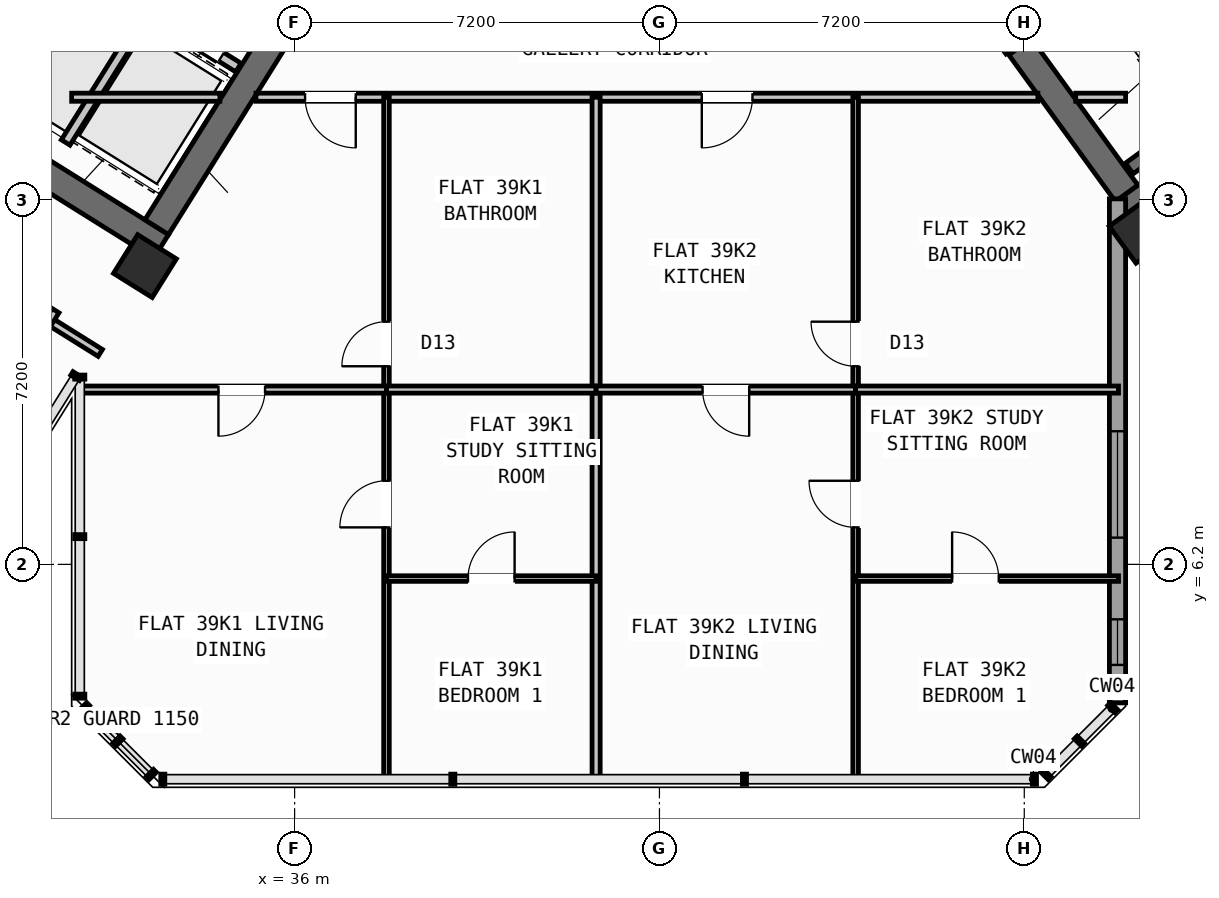
"""IFC4 building model, lengths in metres.
Left out: names, types, materials, properties, quantities, classifications, styles, units other than length and angle.
Written with IfcOpenShell. Run it as: python <this file> out.ifc"""

import sys

from ifc_helpers import new_model, si_unit, direction, frame, frame_2d, origin, origin_2d, place, context, subcontext, project, spatial, rectangle, hollow_rectangle, extrude, source, transform, mapped, element, fill, save


model = new_model("IFC4")
c1 = context("Model", 3, precision=1e-05, world=origin(), true_north=direction((0.0, 1.0)))
c2 = subcontext(c1, "Body", "Model", "MODEL_VIEW")
j1 = project(units=[si_unit("LENGTHUNIT", "METRE"), si_unit("PLANEANGLEUNIT", "RADIAN")], contexts=[c1])
p1 = place(None, origin())
s1 = spatial("IfcSite", under=j1, at=p1, CompositionType="ELEMENT")
p2 = place(p1, origin())
s2 = spatial("IfcBuilding", under=s1, at=p2, CompositionType="ELEMENT")
p3 = place(p2, frame((0.0, 0.0, 155.1)))
s3 = spatial("IfcBuildingStorey", under=s2, at=p3, CompositionType="ELEMENT", Elevation=155.1)
p4 = place(p3, frame((33.366, 12.477, 0.0), z_axis=(0.0, 0.0, 1.0), x_axis=(-0.848047359947, 0.529920442413, 0.0)))
e1 = element("IfcWall", 1, at=p4, inside=s3, PredefinedType="SHEAR", context=c2, shape_type="SweptSolid", body=[
    extrude(rectangle(XDim=13.14, YDim=0.55, at=frame_2d((6.57, 0.0))), origin(), (0.0, 0.0, 1.0), 3.35),
])
p5 = place(p3, frame((36.683, 18.304, 0.0), z_axis=(0.0, 0.0, 1.0), x_axis=(-0.529896466841, -0.848062341122, 0.0)))
e2 = element("IfcWall", 2, at=p5, inside=s3, PredefinedType="SHEAR", context=c2, shape_type="SweptSolid", body=[
    extrude(rectangle(XDim=6.425, YDim=0.55, at=frame_2d((3.212, 0.0))), origin(), (0.0, 0.0, 1.0), 3.35),
])
p6 = place(p3, frame((52.359, 13.14, 0.0), z_axis=(0.0, 0.0, 1.0), x_axis=(0.809014896919, 0.587788139183, 0.0)))
e3 = element("IfcWall", 3, at=p6, inside=s3, PredefinedType="SHEAR", context=c2, shape_type="SweptSolid", body=[
    extrude(rectangle(XDim=12.34, YDim=0.55, at=frame_2d((6.17, 0.0))), origin(), (0.0, 0.0, 1.0), 3.35),
])
p7 = place(p3, frame((52.42, 13.524, 0.0), z_axis=(0.0, 0.0, 1.0), x_axis=(-0.587802113096, 0.809004744015, 0.0)))
e4 = element("IfcWall", 4, at=p7, inside=s3, PredefinedType="SHEAR", context=c2, shape_type="SweptSolid", body=[
    extrude(rectangle(XDim=3.575, YDim=0.55, at=frame_2d((1.788, 0.0))), origin(), (0.0, 0.0, 1.0), 3.35),
])
m1 = source(origin(), c2, "Body", "SweptSolid", [
    extrude(hollow_rectangle(XDim=0.9, YDim=0.9, WallThickness=0.036, at=origin_2d()), origin(), (0.0, 0.0, 1.0), 3.6),
])
for number, where, z_axis, x_axis in (
    (5, (33.046, 12.087, 0.0), (0.0, 0.0, 1.0), (-0.848, 0.53, 0.0)),
    (6, (52.705, 12.773, 0.0), (0.0, 0.0, 1.0), (0.809, 0.588, 0.0)),
):
    element("IfcColumn", number, at=place(p3, frame(where, z_axis=z_axis, x_axis=x_axis)), inside=s3, PredefinedType="COLUMN", context=c2, shape_type="MappedRepresentation", body=[
        mapped(m1, transform((0.0, 0.0, 0.0), scale=1.0)),
    ])
p8 = place(p3, frame((56.581, 7.439, 0.0), z_axis=(0.0, 0.0, 1.0), x_axis=(-0.587771678454, 0.809026856172, 0.0)))
e7 = element("IfcWall", 7, at=p8, inside=s3, PredefinedType="STANDARD", context=c2, shape_type="SweptSolid", body=[
    extrude(rectangle(XDim=6.824, YDim=0.32, at=frame_2d((3.412, 0.0))), origin(), (0.0, 0.0, 1.0), 2.775),
])
p9 = place(p8, frame((1.531, 0.0, 0.8)))
e8 = element("IfcOpeningElement", 8, at=p9, cuts=e7, PredefinedType="OPENING", context=c2, shape_type="SweptSolid", body=[
    extrude(rectangle(XDim=2.1, YDim=1.55, at=frame_2d((1.05, 0.775))), frame((0.0, 0.17, 0.0), z_axis=(0.0, -1.0, 0.0), x_axis=(1.0, 0.0, 0.0)), (0.0, 0.0, 1.0), 0.34),
])
p10 = place(p3, frame((52.24, 13.414, 0.0), z_axis=(0.0, 0.0, 1.0), x_axis=(0.0, -1.0, 0.0)))
e9 = element("IfcWall", 9, at=p10, inside=s3, PredefinedType="STANDARD", context=c2, shape_type="SweptSolid", body=[
    extrude(rectangle(XDim=9.948, YDim=0.32, at=frame_2d((4.974, 0.0))), origin(), (0.0, 0.0, 1.0), 3.35),
])
p11 = place(p10, frame((4.586, 0.0, 0.8)))
e10 = element("IfcOpeningElement", 10, at=p11, cuts=e9, PredefinedType="OPENING", context=c2, shape_type="SweptSolid", body=[
    extrude(rectangle(XDim=2.1, YDim=1.55, at=frame_2d((1.05, 0.775))), frame((0.0, 0.17, 0.0), z_axis=(0.0, -1.0, 0.0), x_axis=(1.0, 0.0, 0.0)), (0.0, 0.0, 1.0), 0.34),
])
p12 = place(p10, frame((8.298, 0.0, 1.0)))
e11 = element("IfcOpeningElement", 11, at=p12, cuts=e9, PredefinedType="OPENING", context=c2, shape_type="SweptSolid", body=[
    extrude(rectangle(XDim=0.9, YDim=1.25, at=frame_2d((0.45, 0.625))), frame((0.0, 0.17, 0.0), z_axis=(0.0, -1.0, 0.0), x_axis=(1.0, 0.0, 0.0)), (0.0, 0.0, 1.0), 0.34),
])
p13 = place(p3, frame((31.288, 18.256, 0.0), z_axis=(0.0, 0.0, 1.0), x_axis=(-0.529943379326, -0.848033026897, 0.0)))
e12 = element("IfcWall", 12, at=p13, inside=s3, PredefinedType="SHEAR", context=c2, shape_type="SweptSolid", body=[
    extrude(rectangle(XDim=3.16, YDim=0.26, at=frame_2d((1.58, 0.0))), origin(), (0.0, 0.0, 1.0), 3.35),
])
p14 = place(p3, frame((34.891, 16.005, 0.0), z_axis=(0.0, 0.0, 1.0), x_axis=(-0.848062873452, 0.529895614884, 0.0)))
e13 = element("IfcWall", 13, at=p14, inside=s3, PredefinedType="STANDARD", context=c2, shape_type="SweptSolid", body=[
    extrude(rectangle(XDim=4.248, YDim=0.2, at=frame_2d((2.124, 0.0))), origin(), (0.0, 0.0, 1.0), 3.34),
])
p15 = place(p14, frame((0.398, 0.0, 0.0)))
e14 = element("IfcOpeningElement", 14, at=p15, cuts=e13, PredefinedType="OPENING", context=c2, shape_type="SweptSolid", body=[
    extrude(rectangle(XDim=1.3, YDim=2.2, at=frame_2d((0.65, 1.1))), frame((0.0, 0.11, 0.0), z_axis=(0.0, -1.0, 0.0), x_axis=(1.0, 0.0, 0.0)), (0.0, 0.0, 1.0), 0.22),
])
p16 = place(p14, frame((2.473, 0.0, 0.0)))
e15 = element("IfcOpeningElement", 15, at=p16, cuts=e13, PredefinedType="OPENING", context=c2, shape_type="SweptSolid", body=[
    extrude(rectangle(XDim=1.45, YDim=2.25, at=frame_2d((0.725, 1.125))), frame((0.0, 0.11, 0.0), z_axis=(0.0, -1.0, 0.0), x_axis=(1.0, 0.0, 0.0)), (0.0, 0.0, 1.0), 0.22),
])
p17 = place(p3, frame((33.029, 17.003, 0.0), z_axis=(0.0, 0.0, 1.0), x_axis=(-0.529916267533, -0.848049968695, 0.0)))
e16 = element("IfcWall", 16, at=p17, inside=s3, PredefinedType="STANDARD", context=c2, shape_type="SweptSolid", body=[
    extrude(rectangle(XDim=2.92, YDim=0.2, at=frame_2d((1.46, 0.0))), origin(), (0.0, 0.0, 1.0), 3.34),
])
p18 = place(p3, frame((52.472, 14.013, 0.0), z_axis=(0.0, 0.0, 1.0), x_axis=(0.809028366311, 0.587769599847, 0.0)))
e17 = element("IfcWall", 17, at=p18, inside=s3, PredefinedType="SHEAR", context=c2, shape_type="SweptSolid", body=[
    extrude(rectangle(XDim=7.33, YDim=0.26, at=frame_2d((3.665, 0.0))), origin(), (0.0, 0.0, 1.0), 3.35),
])
p19 = place(p3, frame((32.164, 10.374, 0.0), z_axis=(0.0, 0.0, 1.0), x_axis=(-0.848044107957, 0.529925646633, 0.0)))
e18 = element("IfcWall", 18, at=p19, inside=s3, PredefinedType="PARTITIONING", context=c2, shape_type="SweptSolid", body=[
    extrude(rectangle(XDim=15.57, YDim=0.16, at=frame_2d((7.785, 0.0))), origin(), (0.0, 0.0, 1.0), 3.34),
])
p20 = place(p19, frame((10.83, 0.0, 0.0)))
e19 = element("IfcOpeningElement", 19, at=p20, cuts=e18, PredefinedType="OPENING", context=c2, shape_type="SweptSolid", body=[
    extrude(rectangle(XDim=1.0, YDim=2.1, at=frame_2d((0.5, 1.05))), frame((0.0, 0.09, 0.0), z_axis=(0.0, -1.0, 0.0), x_axis=(1.0, 0.0, 0.0)), (0.0, 0.0, 1.0), 0.18),
])
p21 = place(p3, frame((31.282, 11.208, 0.0), z_axis=(0.0, 0.0, 1.0), x_axis=(-0.529938869374, -0.84803584519, 0.0)))
e20 = element("IfcWall", 20, at=p21, inside=s3, PredefinedType="PARTITIONING", context=c2, shape_type="SweptSolid", body=[
    extrude(rectangle(XDim=5.48, YDim=0.16, at=frame_2d((2.74, 0.0))), origin(), (0.0, 0.0, 1.0), 3.34),
])
p22 = place(p3, frame((31.6, 15.42, 0.0), z_axis=(0.0, 0.0, 1.0), x_axis=(1.0, 0.0, 0.0)))
e21 = element("IfcWall", 21, at=p22, inside=s3, PredefinedType="PARTITIONING", context=c2, shape_type="SweptSolid", body=[
    extrude(rectangle(XDim=2.925, YDim=0.16, at=frame_2d((1.462, 0.0))), origin(), (0.0, 0.0, 1.0), 3.34),
])
p23 = place(p3, frame((35.237, 15.42, 0.0), z_axis=(0.0, 0.0, 1.0), x_axis=(1.0, 0.0, 0.0)))
e22 = element("IfcWall", 22, at=p23, inside=s3, PredefinedType="PARTITIONING", context=c2, shape_type="SweptSolid", body=[
    extrude(rectangle(XDim=15.432, YDim=0.16, at=frame_2d((7.716, 0.0))), origin(), (0.0, 0.0, 1.0), 3.34),
])
p24 = place(p23, frame((0.969, 0.0, 0.0)))
e23 = element("IfcOpeningElement", 23, at=p24, cuts=e22, PredefinedType="OPENING", context=c2, shape_type="SweptSolid", body=[
    extrude(rectangle(XDim=1.0, YDim=2.1, at=frame_2d((0.5, 1.05))), frame((0.0, 0.09, 0.0), z_axis=(0.0, -1.0, 0.0), x_axis=(1.0, 0.0, 0.0)), (0.0, 0.0, 1.0), 0.18),
])
p25 = place(p23, frame((8.799, 0.0, 0.0)))
e24 = element("IfcOpeningElement", 24, at=p25, cuts=e22, PredefinedType="OPENING", context=c2, shape_type="SweptSolid", body=[
    extrude(rectangle(XDim=1.0, YDim=2.1, at=frame_2d((0.5, 1.05))), frame((0.0, 0.09, 0.0), z_axis=(0.0, -1.0, 0.0), x_axis=(1.0, 0.0, 0.0)), (0.0, 0.0, 1.0), 0.18),
])
p26 = place(p3, frame((51.416, 15.42, 0.0), z_axis=(0.0, 0.0, 1.0), x_axis=(1.0, 0.0, 0.0)))
e25 = element("IfcWall", 25, at=p26, inside=s3, PredefinedType="PARTITIONING", context=c2, shape_type="SweptSolid", body=[
    extrude(rectangle(XDim=0.984, YDim=0.16, at=frame_2d((0.492, 0.0))), origin(), (0.0, 0.0, 1.0), 3.34),
])
p27 = place(p3, frame((50.119, 16.333, 0.0), z_axis=(0.0, 0.0, 1.0), x_axis=(-0.587749856981, 0.809042709391, 0.0)))
e26 = element("IfcWall", 26, at=p27, inside=s3, PredefinedType="STANDARD", context=c2, shape_type="SweptSolid", body=[
    extrude(rectangle(XDim=2.96, YDim=0.2, at=frame_2d((1.48, 0.0))), origin(), (0.0, 0.0, 1.0), 3.34),
])
p28 = place(p27, frame((0.53, 0.0, 0.0)))
e27 = element("IfcOpeningElement", 27, at=p28, cuts=e26, PredefinedType="OPENING", context=c2, shape_type="SweptSolid", body=[
    extrude(rectangle(XDim=1.5, YDim=2.15, at=frame_2d((0.75, 1.075))), frame((0.0, 0.11, 0.0), z_axis=(0.0, -1.0, 0.0), x_axis=(1.0, 0.0, 0.0)), (0.0, 0.0, 1.0), 0.22),
])
p29 = place(p3, frame((41.95, 1.96, 0.0), z_axis=(0.0, 0.0, 1.0), x_axis=(0.0, 1.0, 0.0)))
e28 = element("IfcWall", 28, at=p29, inside=s3, PredefinedType="PARTITIONING", context=c2, shape_type="SweptSolid", body=[
    extrude(rectangle(XDim=13.46, YDim=0.16, at=frame_2d((6.73, 0.0))), origin(), (0.0, 0.0, 1.0), 3.34),
])
p30 = place(p3, frame((37.813, 1.96, 0.0), z_axis=(0.0, 0.0, 1.0), x_axis=(0.0, 1.0, 0.0)))
e29 = element("IfcWall", 29, at=p30, inside=s3, PredefinedType="PARTITIONING", context=c2, shape_type="SweptSolid", body=[
    extrude(rectangle(XDim=13.46, YDim=0.11, at=frame_2d((6.73, 0.0))), origin(), (0.0, 0.0, 1.0), 3.34),
])
p31 = place(p30, frame((4.97, 0.0, 0.0)))
e30 = element("IfcOpeningElement", 30, at=p31, cuts=e29, PredefinedType="OPENING", context=c2, shape_type="SweptSolid", body=[
    extrude(rectangle(XDim=0.92, YDim=2.08, at=frame_2d((0.46, 1.04))), frame((0.0, 0.065, 0.0), z_axis=(0.0, -1.0, 0.0), x_axis=(1.0, 0.0, 0.0)), (0.0, 0.0, 1.0), 0.13),
])
p32 = place(p30, frame((8.15, 0.0, 0.0)))
e31 = element("IfcOpeningElement", 31, at=p32, cuts=e29, PredefinedType="OPENING", context=c2, shape_type="SweptSolid", body=[
    extrude(rectangle(XDim=0.88, YDim=2.08, at=frame_2d((0.44, 1.04))), frame((0.0, 0.065, 0.0), z_axis=(0.0, -1.0, 0.0), x_axis=(1.0, 0.0, 0.0)), (0.0, 0.0, 1.0), 0.13),
])
p33 = place(p3, frame((31.74, 9.65, 0.0), z_axis=(0.0, 0.0, 1.0), x_axis=(1.0, 0.0, 0.0)))
e32 = element("IfcWall", 32, at=p33, inside=s3, PredefinedType="PLUMBINGWALL", context=c2, shape_type="SweptSolid", body=[
    extrude(rectangle(XDim=6.073, YDim=0.14, at=frame_2d((3.037, 0.0))), origin(), (0.0, 0.0, 1.0), 3.34),
])
p34 = place(p33, frame((2.757, 0.0, 0.0)))
e33 = element("IfcOpeningElement", 33, at=p34, cuts=e32, PredefinedType="OPENING", context=c2, shape_type="SweptSolid", body=[
    extrude(rectangle(XDim=0.92, YDim=2.08, at=frame_2d((0.46, 1.04))), frame((0.0, 0.08, 0.0), z_axis=(0.0, -1.0, 0.0), x_axis=(1.0, 0.0, 0.0)), (0.0, 0.0, 1.0), 0.16),
])
p35 = place(p3, frame((37.813, 9.65, 0.0), z_axis=(0.0, 0.0, 1.0), x_axis=(1.0, 0.0, 0.0)))
e34 = element("IfcWall", 34, at=p35, inside=s3, PredefinedType="PLUMBINGWALL", context=c2, shape_type="SweptSolid", body=[
    extrude(rectangle(XDim=4.137, YDim=0.14, at=frame_2d((2.068, 0.0))), origin(), (0.0, 0.0, 1.0), 3.34),
])
p36 = place(p3, frame((37.813, 5.92, 0.0), z_axis=(0.0, 0.0, 1.0), x_axis=(1.0, 0.0, 0.0)))
e35 = element("IfcWall", 35, at=p36, inside=s3, PredefinedType="PARTITIONING", context=c2, shape_type="SweptSolid", body=[
    extrude(rectangle(XDim=4.137, YDim=0.11, at=frame_2d((2.068, 0.0))), origin(), (0.0, 0.0, 1.0), 3.34),
])
p37 = place(p36, frame((1.608, 0.0, 0.0)))
e36 = element("IfcOpeningElement", 36, at=p37, cuts=e35, PredefinedType="OPENING", context=c2, shape_type="SweptSolid", body=[
    extrude(rectangle(XDim=0.92, YDim=2.08, at=frame_2d((0.46, 1.04))), frame((0.0, 0.065, 0.0), z_axis=(0.0, -1.0, 0.0), x_axis=(1.0, 0.0, 0.0)), (0.0, 0.0, 1.0), 0.13),
])
p38 = place(p3, frame((47.072, 1.96, 0.0), z_axis=(0.0, 0.0, 1.0), x_axis=(0.0, 1.0, 0.0)))
e37 = element("IfcWall", 37, at=p38, inside=s3, PredefinedType="PARTITIONING", context=c2, shape_type="SweptSolid", body=[
    extrude(rectangle(XDim=13.46, YDim=0.11, at=frame_2d((6.73, 0.0))), origin(), (0.0, 0.0, 1.0), 3.34),
])
p39 = place(p38, frame((4.97, 0.0, 0.0)))
e38 = element("IfcOpeningElement", 38, at=p39, cuts=e37, PredefinedType="OPENING", context=c2, shape_type="SweptSolid", body=[
    extrude(rectangle(XDim=0.92, YDim=2.08, at=frame_2d((0.46, 1.04))), frame((0.0, 0.065, 0.0), z_axis=(0.0, -1.0, 0.0), x_axis=(1.0, 0.0, 0.0)), (0.0, 0.0, 1.0), 0.13),
])
p40 = place(p38, frame((8.15, 0.0, 0.0)))
e39 = element("IfcOpeningElement", 39, at=p40, cuts=e37, PredefinedType="OPENING", context=c2, shape_type="SweptSolid", body=[
    extrude(rectangle(XDim=0.88, YDim=2.08, at=frame_2d((0.44, 1.04))), frame((0.0, 0.065, 0.0), z_axis=(0.0, -1.0, 0.0), x_axis=(1.0, 0.0, 0.0)), (0.0, 0.0, 1.0), 0.13),
])
p41 = place(p3, frame((41.95, 9.65, 0.0), z_axis=(0.0, 0.0, 1.0), x_axis=(1.0, 0.0, 0.0)))
e40 = element("IfcWall", 40, at=p41, inside=s3, PredefinedType="PLUMBINGWALL", context=c2, shape_type="SweptSolid", body=[
    extrude(rectangle(XDim=5.122, YDim=0.14, at=frame_2d((2.561, 0.0))), origin(), (0.0, 0.0, 1.0), 3.34),
])
p42 = place(p41, frame((2.101, 0.0, 0.0)))
e41 = element("IfcOpeningElement", 41, at=p42, cuts=e40, PredefinedType="OPENING", context=c2, shape_type="SweptSolid", body=[
    extrude(rectangle(XDim=0.92, YDim=2.08, at=frame_2d((0.46, 1.04))), frame((0.0, 0.08, 0.0), z_axis=(0.0, -1.0, 0.0), x_axis=(1.0, 0.0, 0.0)), (0.0, 0.0, 1.0), 0.16),
])
p43 = place(p3, frame((47.072, 9.65, 0.0), z_axis=(0.0, 0.0, 1.0), x_axis=(1.0, 0.0, 0.0)))
e42 = element("IfcWall", 42, at=p43, inside=s3, PredefinedType="PLUMBINGWALL", context=c2, shape_type="SweptSolid", body=[
    extrude(rectangle(XDim=5.188, YDim=0.14, at=frame_2d((2.594, 0.0))), origin(), (0.0, 0.0, 1.0), 3.34),
])
p44 = place(p3, frame((47.072, 5.92, 0.0), z_axis=(0.0, 0.0, 1.0), x_axis=(1.0, 0.0, 0.0)))
e43 = element("IfcWall", 43, at=p44, inside=s3, PredefinedType="PARTITIONING", context=c2, shape_type="SweptSolid", body=[
    extrude(rectangle(XDim=5.188, YDim=0.11, at=frame_2d((2.594, 0.0))), origin(), (0.0, 0.0, 1.0), 3.34),
])
p45 = place(p44, frame((1.904, 0.0, 0.0)))
e44 = element("IfcOpeningElement", 44, at=p45, cuts=e43, PredefinedType="OPENING", context=c2, shape_type="SweptSolid", body=[
    extrude(rectangle(XDim=0.92, YDim=2.08, at=frame_2d((0.46, 1.04))), frame((0.0, 0.065, 0.0), z_axis=(0.0, -1.0, 0.0), x_axis=(1.0, 0.0, 0.0)), (0.0, 0.0, 1.0), 0.13),
])
m2 = source(origin(), c2, "Body", "SweptSolid", [
    extrude(rectangle(XDim=2.1, YDim=1.55, at=frame_2d((1.05, 0.775))), frame((0.0, 0.03, 0.0), z_axis=(0.0, -1.0, 0.0), x_axis=(1.0, 0.0, 0.0)), (0.0, 0.0, 1.0), 0.06),
])
p46 = place(p11, origin())
e45 = element("IfcWindow", 45, at=p46, inside=s3, PartitioningType="SINGLE_PANEL", PredefinedType="WINDOW", context=c2, shape_type="MappedRepresentation", body=[
    mapped(m2, transform((0.0, 0.0, 0.0), scale=1.0)),
])
fill(e10, e45)
m3 = source(origin(), c2, "Body", "SweptSolid", [
    extrude(rectangle(XDim=0.9, YDim=1.25, at=frame_2d((0.45, 0.625))), frame((0.0, 0.03, 0.0), z_axis=(0.0, -1.0, 0.0), x_axis=(1.0, 0.0, 0.0)), (0.0, 0.0, 1.0), 0.06),
])
p47 = place(p12, origin())
e46 = element("IfcWindow", 46, at=p47, inside=s3, PartitioningType="SINGLE_PANEL", PredefinedType="WINDOW", context=c2, shape_type="MappedRepresentation", body=[
    mapped(m3, transform((0.0, 0.0, 0.0), scale=1.0)),
])
fill(e11, e46)
m4 = source(origin(), c2, "Body", "SweptSolid", [
    extrude(rectangle(XDim=1.3, YDim=2.2, at=frame_2d((0.65, 1.1))), frame((0.0, 0.025, 0.0), z_axis=(0.0, -1.0, 0.0), x_axis=(1.0, 0.0, 0.0)), (0.0, 0.0, 1.0), 0.05),
])
p48 = place(p15, origin())
e47 = element("IfcDoor", 47, at=p48, inside=s3, OperationType="DOUBLE_DOOR_SLIDING", PredefinedType="DOOR", context=c2, shape_type="MappedRepresentation", body=[
    mapped(m4, transform((0.0, 0.0, 0.0), scale=1.0)),
])
fill(e14, e47)
m5 = source(origin(), c2, "Body", "SweptSolid", [
    extrude(rectangle(XDim=0.92, YDim=2.08, at=frame_2d((0.46, 1.04))), frame((0.0, 0.025, 0.0), z_axis=(0.0, -1.0, 0.0), x_axis=(1.0, 0.0, 0.0)), (0.0, 0.0, 1.0), 0.05),
])
p49 = place(p31, origin())
e48 = element("IfcDoor", 48, at=p49, inside=s3, OperationType="SINGLE_SWING_LEFT", PredefinedType="DOOR", context=c2, shape_type="MappedRepresentation", body=[
    mapped(m5, transform((0.0, 0.0, 0.0), scale=1.0)),
])
fill(e30, e48)
p50 = place(p37, origin())
e49 = element("IfcDoor", 49, at=p50, inside=s3, OperationType="SINGLE_SWING_RIGHT", PredefinedType="DOOR", context=c2, shape_type="MappedRepresentation", body=[
    mapped(m5, transform((0.0, 0.0, 0.0), scale=1.0)),
])
fill(e36, e49)
m6 = source(origin(), c2, "Body", "SweptSolid", [
    extrude(rectangle(XDim=1.0, YDim=2.1, at=frame_2d((0.5, 1.05))), frame((0.0, 0.025, 0.0), z_axis=(0.0, -1.0, 0.0), x_axis=(1.0, 0.0, 0.0)), (0.0, 0.0, 1.0), 0.05),
])
p51 = place(p24, frame((1.0, 0.0, 0.0), z_axis=(0.0, 0.0, 1.0), x_axis=(-1.0, 0.0, 0.0)))
e50 = element("IfcDoor", 50, at=p51, inside=s3, OperationType="SINGLE_SWING_LEFT", PredefinedType="DOOR", context=c2, shape_type="MappedRepresentation", body=[
    mapped(m6, transform((0.0, 0.0, 0.0), scale=1.0)),
])
fill(e23, e50)
p52 = place(p34, frame((0.92, 0.0, 0.0), z_axis=(0.0, 0.0, 1.0), x_axis=(-1.0, 0.0, 0.0)))
e51 = element("IfcDoor", 51, at=p52, inside=s3, OperationType="SINGLE_SWING_RIGHT", PredefinedType="DOOR", context=c2, shape_type="MappedRepresentation", body=[
    mapped(m5, transform((0.0, 0.0, 0.0), scale=1.0)),
])
fill(e33, e51)
m7 = source(origin(), c2, "Body", "SweptSolid", [
    extrude(rectangle(XDim=0.88, YDim=2.08, at=frame_2d((0.44, 1.04))), frame((0.0, 0.025, 0.0), z_axis=(0.0, -1.0, 0.0), x_axis=(1.0, 0.0, 0.0)), (0.0, 0.0, 1.0), 0.05),
])
p53 = place(p32, origin())
e52 = element("IfcDoor", 52, at=p53, inside=s3, OperationType="SINGLE_SWING_LEFT", PredefinedType="DOOR", context=c2, shape_type="MappedRepresentation", body=[
    mapped(m7, transform((0.0, 0.0, 0.0), scale=1.0)),
])
fill(e31, e52)
p54 = place(p39, origin())
e53 = element("IfcDoor", 53, at=p54, inside=s3, OperationType="SINGLE_SWING_RIGHT", PredefinedType="DOOR", context=c2, shape_type="MappedRepresentation", body=[
    mapped(m5, transform((0.0, 0.0, 0.0), scale=1.0)),
])
fill(e38, e53)
p55 = place(p45, origin())
e54 = element("IfcDoor", 54, at=p55, inside=s3, OperationType="SINGLE_SWING_LEFT", PredefinedType="DOOR", context=c2, shape_type="MappedRepresentation", body=[
    mapped(m5, transform((0.0, 0.0, 0.0), scale=1.0)),
])
fill(e44, e54)
p56 = place(p25, frame((1.0, 0.0, 0.0), z_axis=(0.0, 0.0, 1.0), x_axis=(-1.0, 0.0, 0.0)))
e55 = element("IfcDoor", 55, at=p56, inside=s3, OperationType="SINGLE_SWING_RIGHT", PredefinedType="DOOR", context=c2, shape_type="MappedRepresentation", body=[
    mapped(m6, transform((0.0, 0.0, 0.0), scale=1.0)),
])
fill(e24, e55)
p57 = place(p42, frame((0.92, 0.0, 0.0), z_axis=(0.0, 0.0, 1.0), x_axis=(-1.0, 0.0, 0.0)))
e56 = element("IfcDoor", 56, at=p57, inside=s3, OperationType="SINGLE_SWING_LEFT", PredefinedType="DOOR", context=c2, shape_type="MappedRepresentation", body=[
    mapped(m5, transform((0.0, 0.0, 0.0), scale=1.0)),
])
fill(e41, e56)
p58 = place(p40, origin())
e57 = element("IfcDoor", 57, at=p58, inside=s3, OperationType="SINGLE_SWING_RIGHT", PredefinedType="DOOR", context=c2, shape_type="MappedRepresentation", body=[
    mapped(m7, transform((0.0, 0.0, 0.0), scale=1.0)),
])
fill(e39, e57)
save(model, sys.argv[1])
